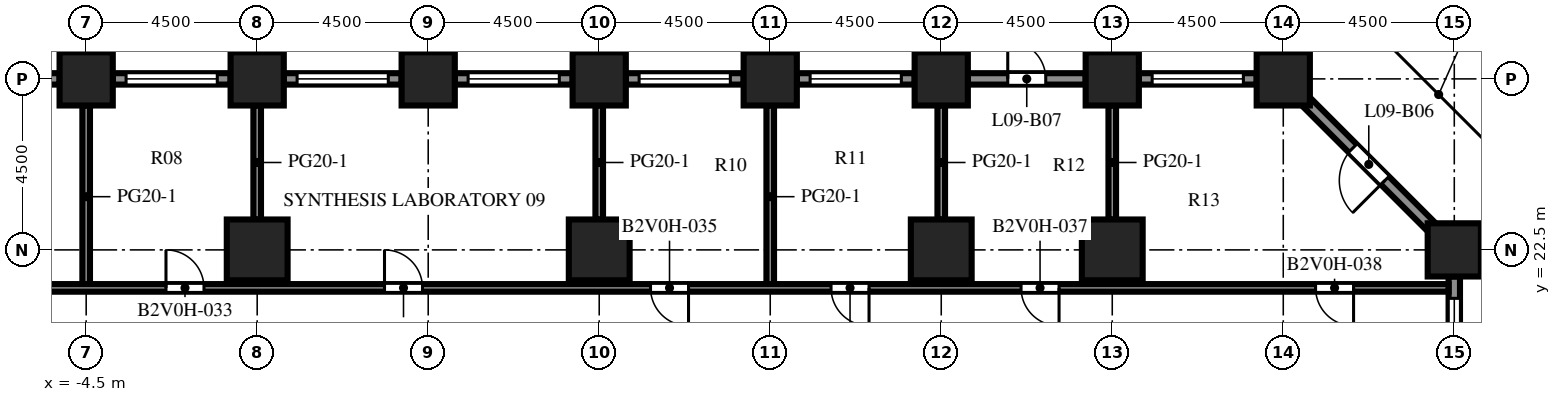
"""IFC4 building model, lengths in metres.
Left out: names, types, materials, properties, quantities, classifications, styles, units other than length and angle.
Written with IfcOpenShell. Run it as: python <this file> out.ifc"""

import sys

from ifc_helpers import new_model, si_unit, direction, frame, frame_2d, origin, origin_2d, place, context, subcontext, project, spatial, rectangle, extrude, element, fill, save


model = new_model("IFC4")
c1 = context("Model", 3, precision=1e-05, world=origin(), true_north=direction((0.0, 1.0)))
c2 = subcontext(c1, "Body", "Model", "MODEL_VIEW")
j1 = project(units=[si_unit("LENGTHUNIT", "METRE"), si_unit("PLANEANGLEUNIT", "RADIAN")], contexts=[c1])
p1 = place(None, origin())
s1 = spatial("IfcSite", under=j1, at=p1, CompositionType="ELEMENT")
p2 = place(p1, origin())
s2 = spatial("IfcBuilding", under=s1, at=p2, CompositionType="ELEMENT")
p3 = place(p2, frame((0.0, 0.0, 41.9)))
s3 = spatial("IfcBuildingStorey", under=s2, at=p3, CompositionType="ELEMENT", Elevation=41.9)
for number, where, z_axis, x_axis in (
    (1, (-4.5, 27.0, 0.0), (0.0, 0.0, 1.0), (1.0, 0.0, 0.0)),
    (2, (0.0, 27.0, 0.0), (0.0, 0.0, 1.0), (1.0, 0.0, 0.0)),
    (3, (4.5, 27.0, 0.0), (0.0, 0.0, 1.0), (1.0, 0.0, 0.0)),
    (4, (9.0, 27.0, 0.0), (0.0, 0.0, 1.0), (1.0, 0.0, 0.0)),
    (5, (13.5, 27.0, 0.0), (0.0, 0.0, 1.0), (1.0, 0.0, 0.0)),
    (6, (18.0, 27.0, 0.0), (0.0, 0.0, 1.0), (1.0, 0.0, 0.0)),
    (7, (22.5, 27.0, 0.0), (0.0, 0.0, 1.0), (1.0, 0.0, 0.0)),
    (8, (27.0, 27.0, 0.0), (0.0, 0.0, 1.0), (1.0, 0.0, 0.0)),
):
    element("IfcColumn", number, at=place(p3, frame(where, z_axis=z_axis, x_axis=x_axis)), inside=s3, PredefinedType="COLUMN", context=c2, shape_type="SweptSolid", body=[
        extrude(rectangle(XDim=1.4, YDim=1.4, at=origin_2d()), origin(), (0.0, 0.0, 1.0), 4.1),
    ])
p4 = place(p3, frame((31.5, 22.5, -0.45), z_axis=(0.0, 0.0, 1.0), x_axis=(1.0, 0.0, 0.0)))
e9 = element("IfcColumn", 9, at=p4, inside=s3, PredefinedType="COLUMN", context=c2, shape_type="SweptSolid", body=[
    extrude(rectangle(XDim=1.4, YDim=1.4, at=origin_2d()), origin(), (0.0, 0.0, 1.0), 4.55),
])
for number, where, z_axis, x_axis in (
    (10, (0.0, 22.5, 0.0), (0.0, 0.0, 1.0), (1.0, 0.0, 0.0)),
    (11, (9.0, 22.5, 0.0), (0.0, 0.0, 1.0), (1.0, 0.0, 0.0)),
    (12, (18.0, 22.5, 0.0), (0.0, 0.0, 1.0), (1.0, 0.0, 0.0)),
    (13, (22.5, 22.5, 0.0), (0.0, 0.0, 1.0), (1.0, 0.0, 0.0)),
):
    element("IfcColumn", number, at=place(p3, frame(where, z_axis=z_axis, x_axis=x_axis)), inside=s3, PredefinedType="COLUMN", context=c2, shape_type="SweptSolid", body=[
        extrude(rectangle(XDim=1.6, YDim=1.6, at=origin_2d()), origin(), (0.0, 0.0, 1.0), 4.1),
    ])
p5 = place(p3, frame((31.5, 21.8, 0.0), z_axis=(0.0, 0.0, 1.0), x_axis=(0.0, -1.0, 0.0)))
e14 = element("IfcWall", 14, at=p5, inside=s3, PredefinedType="SOLIDWALL", context=c2, shape_type="SweptSolid", body=[
    extrude(rectangle(XDim=3.1, YDim=0.3, at=frame_2d((1.55, 0.0))), origin(), (0.0, 0.0, 1.0), 2.75),
])
p6 = place(p5, frame((0.575, 0.0, 0.8)))
e15 = element("IfcOpeningElement", 15, at=p6, cuts=e14, PredefinedType="OPENING", context=c2, shape_type="SweptSolid", body=[
    extrude(rectangle(XDim=2.4, YDim=1.7, at=frame_2d((1.2, 0.85))), frame((0.0, 0.16, 0.0), z_axis=(0.0, -1.0, 0.0), x_axis=(1.0, 0.0, 0.0)), (0.0, 0.0, 1.0), 0.32),
])
p7 = place(p3, frame((27.594, 26.406, 0.0), z_axis=(0.0, 0.0, 1.0), x_axis=(0.707106781187, -0.707106781187, 0.0)))
e16 = element("IfcWall", 16, at=p7, inside=s3, PredefinedType="SOLIDWALL", context=c2, shape_type="SweptSolid", body=[
    extrude(rectangle(XDim=4.684, YDim=0.3, at=frame_2d((2.342, 0.0))), origin(), (0.0, 0.0, 1.0), 2.75),
])
p8 = place(p7, frame((1.742, 0.0, 0.0)))
e17 = element("IfcOpeningElement", 17, at=p8, cuts=e16, PredefinedType="OPENING", context=c2, shape_type="SweptSolid", body=[
    extrude(rectangle(XDim=1.2, YDim=2.2, at=frame_2d((0.6, 1.1))), frame((0.0, 0.16, 0.0), z_axis=(0.0, -1.0, 0.0), x_axis=(1.0, 0.0, 0.0)), (0.0, 0.0, 1.0), 0.32),
])
p9 = place(p3, frame((23.2, 27.0, 0.0), z_axis=(0.0, 0.0, 1.0), x_axis=(1.0, 0.0, 0.0)))
e18 = element("IfcWall", 18, at=p9, inside=s3, PredefinedType="SOLIDWALL", context=c2, shape_type="SweptSolid", body=[
    extrude(rectangle(XDim=3.1, YDim=0.3, at=frame_2d((1.55, 0.0))), origin(), (0.0, 0.0, 1.0), 2.75),
])
p10 = place(p9, frame((0.35, 0.0, 0.8)))
e19 = element("IfcOpeningElement", 19, at=p10, cuts=e18, PredefinedType="OPENING", context=c2, shape_type="SweptSolid", body=[
    extrude(rectangle(XDim=2.4, YDim=1.7, at=frame_2d((1.2, 0.85))), frame((0.0, 0.16, 0.0), z_axis=(0.0, -1.0, 0.0), x_axis=(1.0, 0.0, 0.0)), (0.0, 0.0, 1.0), 0.32),
])
p11 = place(p3, frame((18.7, 27.0, 0.0), z_axis=(0.0, 0.0, 1.0), x_axis=(1.0, 0.0, 0.0)))
e20 = element("IfcWall", 20, at=p11, inside=s3, PredefinedType="SOLIDWALL", context=c2, shape_type="SweptSolid", body=[
    extrude(rectangle(XDim=3.1, YDim=0.3, at=frame_2d((1.55, 0.0))), origin(), (0.0, 0.0, 1.0), 2.75),
])
p12 = place(p11, frame((1.05, 0.0, 0.0)))
e21 = element("IfcOpeningElement", 21, at=p12, cuts=e20, PredefinedType="OPENING", context=c2, shape_type="SweptSolid", body=[
    extrude(rectangle(XDim=1.0, YDim=2.2, at=frame_2d((0.5, 1.1))), frame((0.0, 0.16, 0.0), z_axis=(0.0, -1.0, 0.0), x_axis=(1.0, 0.0, 0.0)), (0.0, 0.0, 1.0), 0.32),
])
p13 = place(p3, frame((14.2, 27.0, 0.0), z_axis=(0.0, 0.0, 1.0), x_axis=(1.0, 0.0, 0.0)))
e22 = element("IfcWall", 22, at=p13, inside=s3, PredefinedType="SOLIDWALL", context=c2, shape_type="SweptSolid", body=[
    extrude(rectangle(XDim=3.1, YDim=0.3, at=frame_2d((1.55, 0.0))), origin(), (0.0, 0.0, 1.0), 2.75),
])
p14 = place(p13, frame((0.35, 0.0, 0.8)))
e23 = element("IfcOpeningElement", 23, at=p14, cuts=e22, PredefinedType="OPENING", context=c2, shape_type="SweptSolid", body=[
    extrude(rectangle(XDim=2.4, YDim=1.7, at=frame_2d((1.2, 0.85))), frame((0.0, 0.16, 0.0), z_axis=(0.0, -1.0, 0.0), x_axis=(1.0, 0.0, 0.0)), (0.0, 0.0, 1.0), 0.32),
])
p15 = place(p3, frame((9.7, 27.0, 0.0), z_axis=(0.0, 0.0, 1.0), x_axis=(1.0, 0.0, 0.0)))
e24 = element("IfcWall", 24, at=p15, inside=s3, PredefinedType="SOLIDWALL", context=c2, shape_type="SweptSolid", body=[
    extrude(rectangle(XDim=3.1, YDim=0.3, at=frame_2d((1.55, 0.0))), origin(), (0.0, 0.0, 1.0), 2.75),
])
p16 = place(p15, frame((0.35, 0.0, 0.8)))
e25 = element("IfcOpeningElement", 25, at=p16, cuts=e24, PredefinedType="OPENING", context=c2, shape_type="SweptSolid", body=[
    extrude(rectangle(XDim=2.4, YDim=1.7, at=frame_2d((1.2, 0.85))), frame((0.0, 0.16, 0.0), z_axis=(0.0, -1.0, 0.0), x_axis=(1.0, 0.0, 0.0)), (0.0, 0.0, 1.0), 0.32),
])
p17 = place(p3, frame((5.2, 27.0, 0.0), z_axis=(0.0, 0.0, 1.0), x_axis=(1.0, 0.0, 0.0)))
e26 = element("IfcWall", 26, at=p17, inside=s3, PredefinedType="SOLIDWALL", context=c2, shape_type="SweptSolid", body=[
    extrude(rectangle(XDim=3.1, YDim=0.3, at=frame_2d((1.55, 0.0))), origin(), (0.0, 0.0, 1.0), 2.75),
])
p18 = place(p17, frame((0.35, 0.0, 0.8)))
e27 = element("IfcOpeningElement", 27, at=p18, cuts=e26, PredefinedType="OPENING", context=c2, shape_type="SweptSolid", body=[
    extrude(rectangle(XDim=2.4, YDim=1.7, at=frame_2d((1.2, 0.85))), frame((0.0, 0.16, 0.0), z_axis=(0.0, -1.0, 0.0), x_axis=(1.0, 0.0, 0.0)), (0.0, 0.0, 1.0), 0.32),
])
p19 = place(p3, frame((0.7, 27.0, 0.0), z_axis=(0.0, 0.0, 1.0), x_axis=(1.0, 0.0, 0.0)))
e28 = element("IfcWall", 28, at=p19, inside=s3, PredefinedType="SOLIDWALL", context=c2, shape_type="SweptSolid", body=[
    extrude(rectangle(XDim=3.1, YDim=0.3, at=frame_2d((1.55, 0.0))), origin(), (0.0, 0.0, 1.0), 2.75),
])
p20 = place(p19, frame((0.35, 0.0, 0.8)))
e29 = element("IfcOpeningElement", 29, at=p20, cuts=e28, PredefinedType="OPENING", context=c2, shape_type="SweptSolid", body=[
    extrude(rectangle(XDim=2.4, YDim=1.7, at=frame_2d((1.2, 0.85))), frame((0.0, 0.16, 0.0), z_axis=(0.0, -1.0, 0.0), x_axis=(1.0, 0.0, 0.0)), (0.0, 0.0, 1.0), 0.32),
])
p21 = place(p3, frame((-3.8, 27.0, 0.0), z_axis=(0.0, 0.0, 1.0), x_axis=(1.0, 0.0, 0.0)))
e30 = element("IfcWall", 30, at=p21, inside=s3, PredefinedType="SOLIDWALL", context=c2, shape_type="SweptSolid", body=[
    extrude(rectangle(XDim=3.1, YDim=0.3, at=frame_2d((1.55, 0.0))), origin(), (0.0, 0.0, 1.0), 2.75),
])
p22 = place(p21, frame((0.35, 0.0, 0.8)))
e31 = element("IfcOpeningElement", 31, at=p22, cuts=e30, PredefinedType="OPENING", context=c2, shape_type="SweptSolid", body=[
    extrude(rectangle(XDim=2.4, YDim=1.7, at=frame_2d((1.2, 0.85))), frame((0.0, 0.16, 0.0), z_axis=(0.0, -1.0, 0.0), x_axis=(1.0, 0.0, 0.0)), (0.0, 0.0, 1.0), 0.32),
])
p23 = place(p3, frame((-8.3, 27.0, 0.0), z_axis=(0.0, 0.0, 1.0), x_axis=(1.0, 0.0, 0.0)))
e32 = element("IfcWall", 32, at=p23, inside=s3, PredefinedType="SOLIDWALL", context=c2, shape_type="SweptSolid", body=[
    extrude(rectangle(XDim=3.1, YDim=0.3, at=frame_2d((1.55, 0.0))), origin(), (0.0, 0.0, 1.0), 2.75),
])
p24 = place(p23, frame((0.35, 0.0, 0.8)))
e33 = element("IfcOpeningElement", 33, at=p24, cuts=e32, PredefinedType="OPENING", context=c2, shape_type="SweptSolid", body=[
    extrude(rectangle(XDim=2.4, YDim=1.7, at=frame_2d((1.2, 0.85))), frame((0.0, 0.16, 0.0), z_axis=(0.0, -1.0, 0.0), x_axis=(1.0, 0.0, 0.0)), (0.0, 0.0, 1.0), 0.32),
])
p25 = place(p3, frame((-4.5, 21.5, 0.0), z_axis=(0.0, 0.0, 1.0), x_axis=(0.0, 1.0, 0.0)))
e34 = element("IfcWall", 34, at=p25, inside=s3, PredefinedType="PARTITIONING", context=c2, shape_type="SweptSolid", body=[
    extrude(rectangle(XDim=4.8, YDim=0.2, at=frame_2d((2.4, 0.0))), origin(), (0.0, 0.0, 1.0), 3.65),
])
for number, where, z_axis, x_axis in (
    (35, (0.0, 23.3, 0.0), (0.0, 0.0, 1.0), (0.0, 1.0, 0.0)),
    (36, (9.0, 23.3, 0.0), (0.0, 0.0, 1.0), (0.0, 1.0, 0.0)),
):
    element("IfcWall", number, at=place(p3, frame(where, z_axis=z_axis, x_axis=x_axis)), inside=s3, PredefinedType="PARTITIONING", context=c2, shape_type="SweptSolid", body=[
        extrude(rectangle(XDim=3.0, YDim=0.2, at=frame_2d((1.5, 0.0))), origin(), (0.0, 0.0, 1.0), 3.65),
    ])
p26 = place(p3, frame((13.5, 21.5, 0.0), z_axis=(0.0, 0.0, 1.0), x_axis=(0.0, 1.0, 0.0)))
e37 = element("IfcWall", 37, at=p26, inside=s3, PredefinedType="PARTITIONING", context=c2, shape_type="SweptSolid", body=[
    extrude(rectangle(XDim=4.8, YDim=0.2, at=frame_2d((2.4, 0.0))), origin(), (0.0, 0.0, 1.0), 3.65),
])
for number, where, z_axis, x_axis in (
    (38, (18.0, 23.3, 0.0), (0.0, 0.0, 1.0), (0.0, 1.0, 0.0)),
    (39, (22.5, 23.3, 0.0), (0.0, 0.0, 1.0), (0.0, 1.0, 0.0)),
):
    element("IfcWall", number, at=place(p3, frame(where, z_axis=z_axis, x_axis=x_axis)), inside=s3, PredefinedType="PARTITIONING", context=c2, shape_type="SweptSolid", body=[
        extrude(rectangle(XDim=3.0, YDim=0.2, at=frame_2d((1.5, 0.0))), origin(), (0.0, 0.0, 1.0), 3.65),
    ])
p27 = place(p3, frame((-22.35, 21.5, 0.0), z_axis=(0.0, 0.0, 1.0), x_axis=(1.0, 0.0, 0.0)))
e40 = element("IfcWall", 40, at=p27, inside=s3, PredefinedType="PARTITIONING", context=c2, shape_type="SweptSolid", body=[
    extrude(rectangle(XDim=53.7, YDim=0.2, at=frame_2d((26.85, 0.0))), origin(), (0.0, 0.0, 1.0), 3.65),
])
p28 = place(p27, frame((1.45, 0.0, 0.0)))
e41 = element("IfcOpeningElement", 41, at=p28, cuts=e40, PredefinedType="OPENING", context=c2, shape_type="SweptSolid", body=[
    extrude(rectangle(XDim=1.0, YDim=2.1, at=frame_2d((0.5, 1.05))), frame((0.0, 0.11, 0.0), z_axis=(0.0, -1.0, 0.0), x_axis=(1.0, 0.0, 0.0)), (0.0, 0.0, 1.0), 0.22),
])
p29 = place(p27, frame((11.45, 0.0, 0.0)))
e42 = element("IfcOpeningElement", 42, at=p29, cuts=e40, PredefinedType="OPENING", context=c2, shape_type="SweptSolid", body=[
    extrude(rectangle(XDim=1.0, YDim=2.1, at=frame_2d((0.5, 1.05))), frame((0.0, 0.11, 0.0), z_axis=(0.0, -1.0, 0.0), x_axis=(1.0, 0.0, 0.0)), (0.0, 0.0, 1.0), 0.22),
])
p30 = place(p27, frame((19.95, 0.0, 0.0)))
e43 = element("IfcOpeningElement", 43, at=p30, cuts=e40, PredefinedType="OPENING", context=c2, shape_type="SweptSolid", body=[
    extrude(rectangle(XDim=1.0, YDim=2.1, at=frame_2d((0.5, 1.05))), frame((0.0, 0.11, 0.0), z_axis=(0.0, -1.0, 0.0), x_axis=(1.0, 0.0, 0.0)), (0.0, 0.0, 1.0), 0.22),
])
p31 = place(p27, frame((25.7, 0.0, 0.0)))
e44 = element("IfcOpeningElement", 44, at=p31, cuts=e40, PredefinedType="OPENING", context=c2, shape_type="SweptSolid", body=[
    extrude(rectangle(XDim=1.0, YDim=2.1, at=frame_2d((0.5, 1.05))), frame((0.0, 0.11, 0.0), z_axis=(0.0, -1.0, 0.0), x_axis=(1.0, 0.0, 0.0)), (0.0, 0.0, 1.0), 0.22),
])
p32 = place(p27, frame((32.7, 0.0, 0.0)))
e45 = element("IfcOpeningElement", 45, at=p32, cuts=e40, PredefinedType="OPENING", context=c2, shape_type="SweptSolid", body=[
    extrude(rectangle(XDim=1.0, YDim=2.1, at=frame_2d((0.5, 1.05))), frame((0.0, 0.11, 0.0), z_axis=(0.0, -1.0, 0.0), x_axis=(1.0, 0.0, 0.0)), (0.0, 0.0, 1.0), 0.22),
])
p33 = place(p27, frame((37.45, 0.0, 0.0)))
e46 = element("IfcOpeningElement", 46, at=p33, cuts=e40, PredefinedType="OPENING", context=c2, shape_type="SweptSolid", body=[
    extrude(rectangle(XDim=1.0, YDim=2.1, at=frame_2d((0.5, 1.05))), frame((0.0, 0.11, 0.0), z_axis=(0.0, -1.0, 0.0), x_axis=(1.0, 0.0, 0.0)), (0.0, 0.0, 1.0), 0.22),
])
p34 = place(p27, frame((42.45, 0.0, 0.0)))
e47 = element("IfcOpeningElement", 47, at=p34, cuts=e40, PredefinedType="OPENING", context=c2, shape_type="SweptSolid", body=[
    extrude(rectangle(XDim=1.0, YDim=2.1, at=frame_2d((0.5, 1.05))), frame((0.0, 0.11, 0.0), z_axis=(0.0, -1.0, 0.0), x_axis=(1.0, 0.0, 0.0)), (0.0, 0.0, 1.0), 0.22),
])
p35 = place(p27, frame((50.2, 0.0, 0.0)))
e48 = element("IfcOpeningElement", 48, at=p35, cuts=e40, PredefinedType="OPENING", context=c2, shape_type="SweptSolid", body=[
    extrude(rectangle(XDim=1.0, YDim=2.1, at=frame_2d((0.5, 1.05))), frame((0.0, 0.11, 0.0), z_axis=(0.0, -1.0, 0.0), x_axis=(1.0, 0.0, 0.0)), (0.0, 0.0, 1.0), 0.22),
])
p36 = place(p6, origin())
e49 = element("IfcWindow", 49, at=p36, inside=s3, PartitioningType="SINGLE_PANEL", PredefinedType="WINDOW", context=c2, shape_type="SweptSolid", body=[
    extrude(rectangle(XDim=2.4, YDim=1.7, at=frame_2d((1.2, 0.85))), frame((0.0, 0.03, 0.0), z_axis=(0.0, -1.0, 0.0), x_axis=(1.0, 0.0, 0.0)), (0.0, 0.0, 1.0), 0.06),
])
fill(e15, e49)
p37 = place(p8, origin())
e50 = element("IfcDoor", 50, at=p37, inside=s3, OperationType="SINGLE_SWING_RIGHT", PredefinedType="DOOR", context=c2, shape_type="SweptSolid", body=[
    extrude(rectangle(XDim=1.2, YDim=2.2, at=frame_2d((0.6, 1.1))), frame((0.0, 0.025, 0.0), z_axis=(0.0, -1.0, 0.0), x_axis=(1.0, 0.0, 0.0)), (0.0, 0.0, 1.0), 0.05),
])
fill(e17, e50)
p38 = place(p10, origin())
e51 = element("IfcWindow", 51, at=p38, inside=s3, PartitioningType="SINGLE_PANEL", PredefinedType="WINDOW", context=c2, shape_type="SweptSolid", body=[
    extrude(rectangle(XDim=2.4, YDim=1.7, at=frame_2d((1.2, 0.85))), frame((0.0, 0.03, 0.0), z_axis=(0.0, -1.0, 0.0), x_axis=(1.0, 0.0, 0.0)), (0.0, 0.0, 1.0), 0.06),
])
fill(e19, e51)
p39 = place(p12, origin())
e52 = element("IfcDoor", 52, at=p39, inside=s3, OperationType="SINGLE_SWING_LEFT", PredefinedType="DOOR", context=c2, shape_type="SweptSolid", body=[
    extrude(rectangle(XDim=1.0, YDim=2.2, at=frame_2d((0.5, 1.1))), frame((0.0, 0.025, 0.0), z_axis=(0.0, -1.0, 0.0), x_axis=(1.0, 0.0, 0.0)), (0.0, 0.0, 1.0), 0.05),
])
fill(e21, e52)
p40 = place(p14, origin())
e53 = element("IfcWindow", 53, at=p40, inside=s3, PartitioningType="SINGLE_PANEL", PredefinedType="WINDOW", context=c2, shape_type="SweptSolid", body=[
    extrude(rectangle(XDim=2.4, YDim=1.7, at=frame_2d((1.2, 0.85))), frame((0.0, 0.03, 0.0), z_axis=(0.0, -1.0, 0.0), x_axis=(1.0, 0.0, 0.0)), (0.0, 0.0, 1.0), 0.06),
])
fill(e23, e53)
p41 = place(p16, origin())
e54 = element("IfcWindow", 54, at=p41, inside=s3, PartitioningType="SINGLE_PANEL", PredefinedType="WINDOW", context=c2, shape_type="SweptSolid", body=[
    extrude(rectangle(XDim=2.4, YDim=1.7, at=frame_2d((1.2, 0.85))), frame((0.0, 0.03, 0.0), z_axis=(0.0, -1.0, 0.0), x_axis=(1.0, 0.0, 0.0)), (0.0, 0.0, 1.0), 0.06),
])
fill(e25, e54)
p42 = place(p18, origin())
e55 = element("IfcWindow", 55, at=p42, inside=s3, PartitioningType="SINGLE_PANEL", PredefinedType="WINDOW", context=c2, shape_type="SweptSolid", body=[
    extrude(rectangle(XDim=2.4, YDim=1.7, at=frame_2d((1.2, 0.85))), frame((0.0, 0.03, 0.0), z_axis=(0.0, -1.0, 0.0), x_axis=(1.0, 0.0, 0.0)), (0.0, 0.0, 1.0), 0.06),
])
fill(e27, e55)
p43 = place(p20, origin())
e56 = element("IfcWindow", 56, at=p43, inside=s3, PartitioningType="SINGLE_PANEL", PredefinedType="WINDOW", context=c2, shape_type="SweptSolid", body=[
    extrude(rectangle(XDim=2.4, YDim=1.7, at=frame_2d((1.2, 0.85))), frame((0.0, 0.03, 0.0), z_axis=(0.0, -1.0, 0.0), x_axis=(1.0, 0.0, 0.0)), (0.0, 0.0, 1.0), 0.06),
])
fill(e29, e56)
p44 = place(p22, origin())
e57 = element("IfcWindow", 57, at=p44, inside=s3, PartitioningType="SINGLE_PANEL", PredefinedType="WINDOW", context=c2, shape_type="SweptSolid", body=[
    extrude(rectangle(XDim=2.4, YDim=1.7, at=frame_2d((1.2, 0.85))), frame((0.0, 0.03, 0.0), z_axis=(0.0, -1.0, 0.0), x_axis=(1.0, 0.0, 0.0)), (0.0, 0.0, 1.0), 0.06),
])
fill(e31, e57)
p45 = place(p30, origin())
e58 = element("IfcDoor", 58, at=p45, inside=s3, OperationType="SINGLE_SWING_LEFT", PredefinedType="DOOR", context=c2, shape_type="SweptSolid", body=[
    extrude(rectangle(XDim=1.0, YDim=2.1, at=frame_2d((0.5, 1.05))), frame((0.0, 0.025, 0.0), z_axis=(0.0, -1.0, 0.0), x_axis=(1.0, 0.0, 0.0)), (0.0, 0.0, 1.0), 0.05),
])
fill(e43, e58)
p46 = place(p31, origin())
e59 = element("IfcDoor", 59, at=p46, inside=s3, OperationType="SINGLE_SWING_LEFT", PredefinedType="DOOR", context=c2, shape_type="SweptSolid", body=[
    extrude(rectangle(XDim=1.0, YDim=2.1, at=frame_2d((0.5, 1.05))), frame((0.0, 0.025, 0.0), z_axis=(0.0, -1.0, 0.0), x_axis=(1.0, 0.0, 0.0)), (0.0, 0.0, 1.0), 0.05),
])
fill(e44, e59)
p47 = place(p32, origin())
e60 = element("IfcDoor", 60, at=p47, inside=s3, OperationType="SINGLE_SWING_RIGHT", PredefinedType="DOOR", context=c2, shape_type="SweptSolid", body=[
    extrude(rectangle(XDim=1.0, YDim=2.1, at=frame_2d((0.5, 1.05))), frame((0.0, 0.025, 0.0), z_axis=(0.0, -1.0, 0.0), x_axis=(1.0, 0.0, 0.0)), (0.0, 0.0, 1.0), 0.05),
])
fill(e45, e60)
p48 = place(p33, origin())
e61 = element("IfcDoor", 61, at=p48, inside=s3, OperationType="SINGLE_SWING_RIGHT", PredefinedType="DOOR", context=c2, shape_type="SweptSolid", body=[
    extrude(rectangle(XDim=1.0, YDim=2.1, at=frame_2d((0.5, 1.05))), frame((0.0, 0.025, 0.0), z_axis=(0.0, -1.0, 0.0), x_axis=(1.0, 0.0, 0.0)), (0.0, 0.0, 1.0), 0.05),
])
fill(e46, e61)
p49 = place(p34, origin())
e62 = element("IfcDoor", 62, at=p49, inside=s3, OperationType="SINGLE_SWING_RIGHT", PredefinedType="DOOR", context=c2, shape_type="SweptSolid", body=[
    extrude(rectangle(XDim=1.0, YDim=2.1, at=frame_2d((0.5, 1.05))), frame((0.0, 0.025, 0.0), z_axis=(0.0, -1.0, 0.0), x_axis=(1.0, 0.0, 0.0)), (0.0, 0.0, 1.0), 0.05),
])
fill(e47, e62)
p50 = place(p35, origin())
e63 = element("IfcDoor", 63, at=p50, inside=s3, OperationType="SINGLE_SWING_RIGHT", PredefinedType="DOOR", context=c2, shape_type="SweptSolid", body=[
    extrude(rectangle(XDim=1.0, YDim=2.1, at=frame_2d((0.5, 1.05))), frame((0.0, 0.025, 0.0), z_axis=(0.0, -1.0, 0.0), x_axis=(1.0, 0.0, 0.0)), (0.0, 0.0, 1.0), 0.05),
])
fill(e48, e63)
save(model, sys.argv[1])
